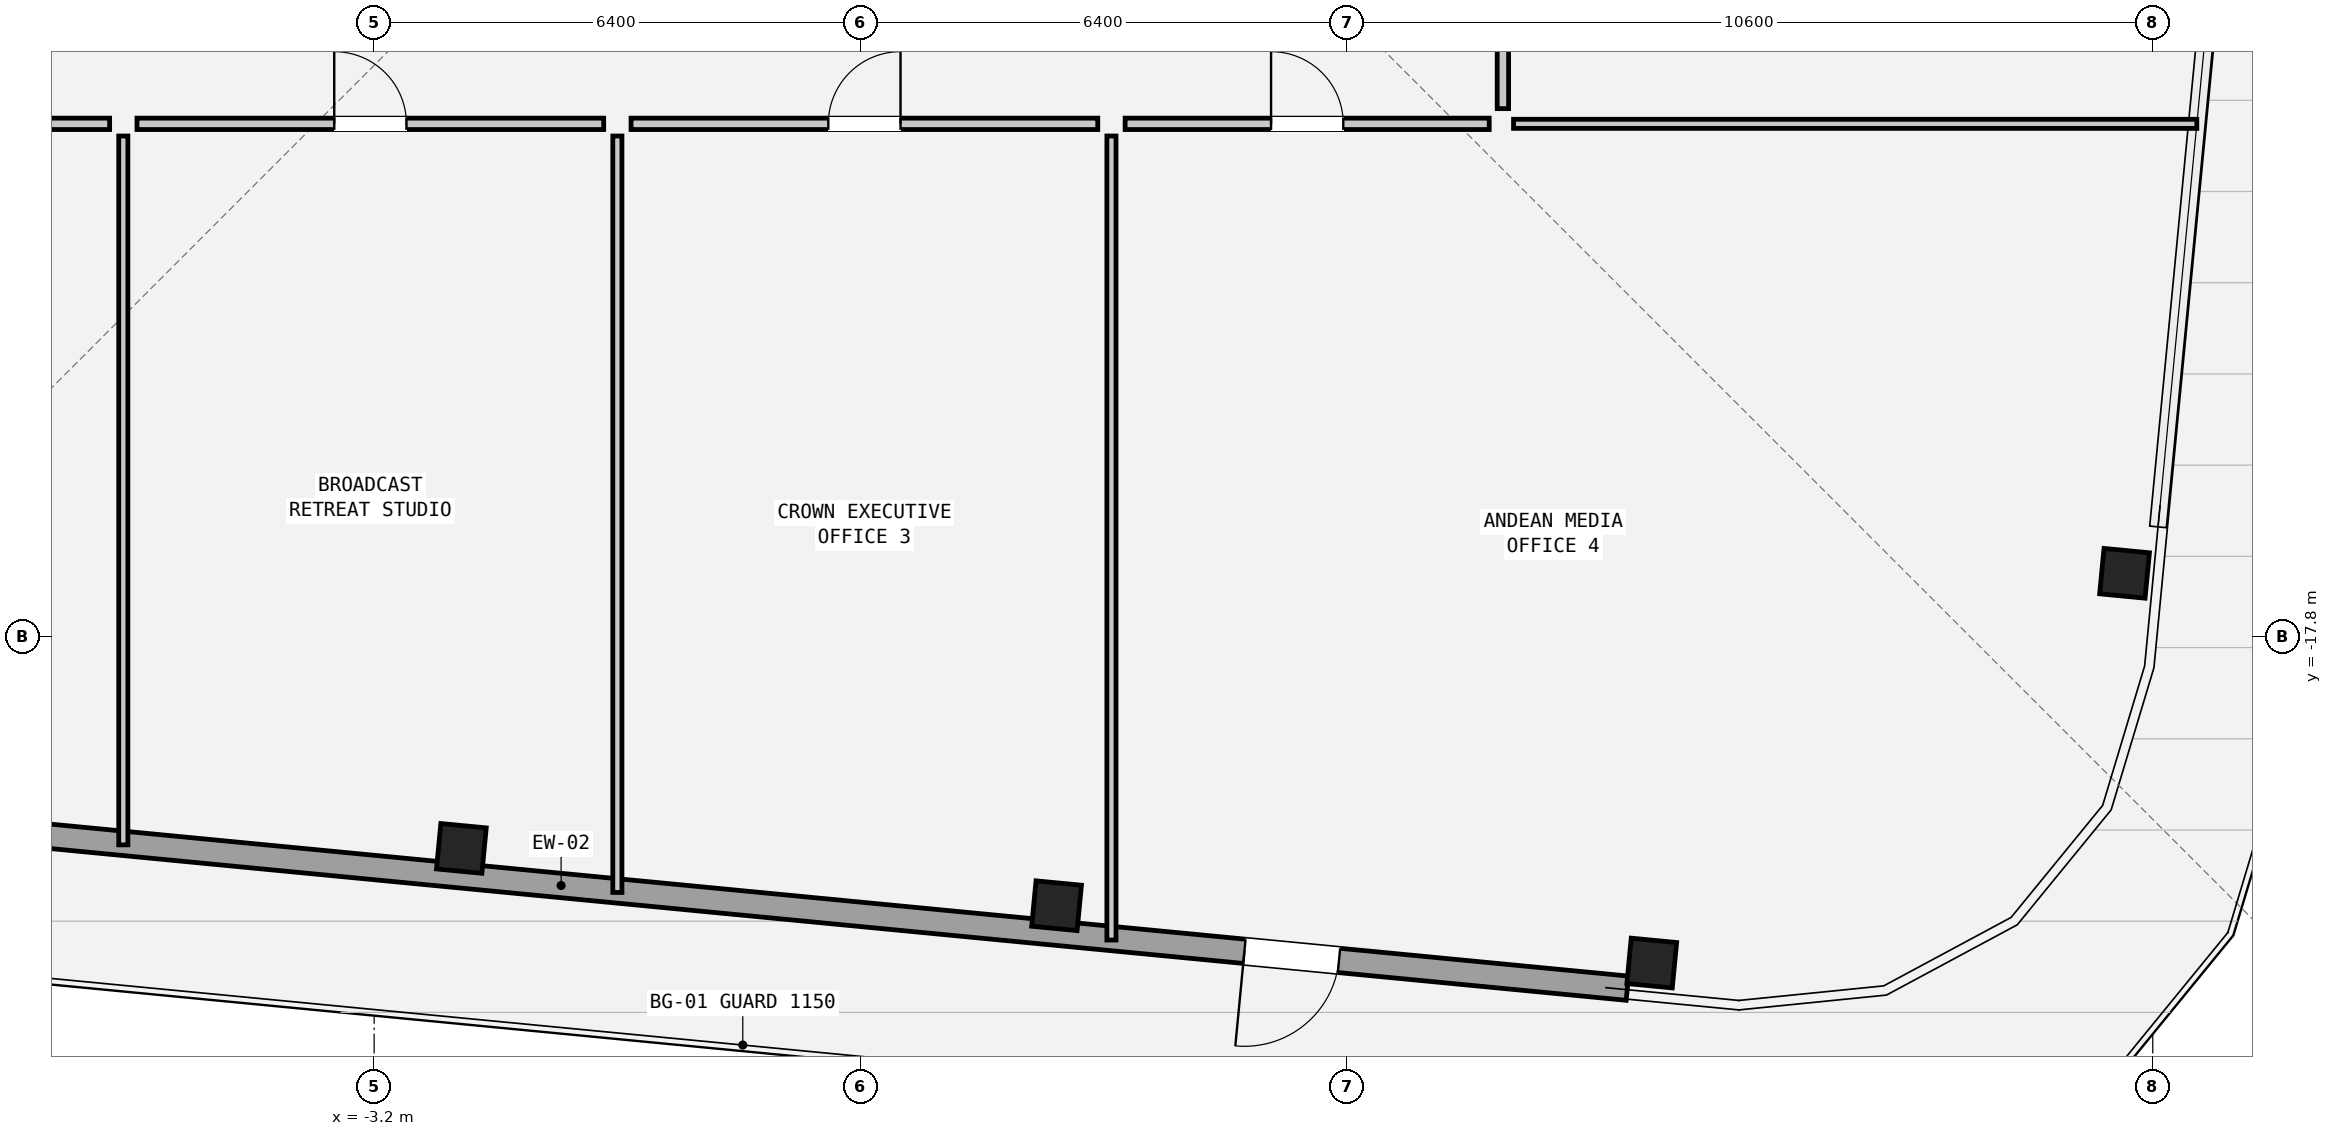
"""IFC4 building model, lengths in metres.
Left out: names, types, materials, properties, quantities, classifications, styles, units other than length and angle.
Written with IfcOpenShell. Run it as: python <this file> out.ifc"""

import sys

from ifc_helpers import new_model, si_unit, direction, frame, frame_2d, origin, origin_2d, place, context, subcontext, project, spatial, rectangle, hollow_rectangle, extrude, element, fill, save


model = new_model("IFC4")
c1 = context("Model", 3, precision=1e-05, world=origin(), true_north=direction((0.0, 1.0)))
c2 = subcontext(c1, "Body", "Model", "MODEL_VIEW")
j1 = project(units=[si_unit("LENGTHUNIT", "METRE"), si_unit("PLANEANGLEUNIT", "RADIAN")], contexts=[c1])
p1 = place(None, origin())
s1 = spatial("IfcSite", under=j1, at=p1, CompositionType="ELEMENT")
p2 = place(p1, origin())
s2 = spatial("IfcBuilding", under=s1, at=p2, CompositionType="ELEMENT")
p3 = place(p2, frame((0.0, 0.0, 273.35)))
s3 = spatial("IfcBuildingStorey", under=s2, at=p3, CompositionType="ELEMENT", Elevation=273.35)
for number, where, z_axis, x_axis in (
    (1, (-2.052, -20.583, 0.0), (0.0, 0.0, 1.0), (0.995, -0.096, 0.0)),
    (2, (5.778, -21.336, 0.0), (0.0, 0.0, 1.0), (0.995, -0.096, 0.0)),
    (3, (13.608, -22.09, 0.0), (0.0, 0.0, 1.0), (0.995, -0.096, 0.0)),
    (4, (19.829, -16.963, 0.0), (0.0, 0.0, 1.0), (0.096, 0.995, 0.0)),
):
    element("IfcColumn", number, at=place(p3, frame(where, z_axis=z_axis, x_axis=x_axis)), inside=s3, PredefinedType="COLUMN", context=c2, shape_type="SweptSolid", body=[
        extrude(hollow_rectangle(XDim=0.6, YDim=0.6, WallThickness=0.04, at=origin_2d()), origin(), (0.0, 0.0, 1.0), 3.6),
    ])
p4 = place(p3, frame((13.287, -22.421, 0.0), z_axis=(0.0, 0.0, 1.0), x_axis=(-0.995396042099, 0.095847375411, 0.0)))
e5 = element("IfcWall", 5, at=p4, inside=s3, PredefinedType="SOLIDWALL", context=c2, shape_type="SweptSolid", body=[
    extrude(rectangle(XDim=23.024, YDim=0.32, at=frame_2d((11.512, 0.0))), origin(), (0.0, 0.0, 1.0), 2.984),
])
p5 = place(p4, frame((3.811, 0.0, 0.0)))
e6 = element("IfcOpeningElement", 6, at=p5, cuts=e5, PredefinedType="OPENING", context=c2, shape_type="SweptSolid", body=[
    extrude(rectangle(XDim=1.25, YDim=2.02, at=frame_2d((0.625, 1.01))), frame((0.0, 0.172, 0.0), z_axis=(0.0, -1.0, 0.0), x_axis=(1.0, 0.0, 0.0)), (0.0, 0.0, 1.0), 0.344),
])
p6 = place(p3, frame((11.79, -11.05, 0.0), z_axis=(0.0, 0.0, 1.0), x_axis=(1.0, 0.0, 0.0)))
e7 = element("IfcWall", 7, at=p6, inside=s3, PredefinedType="PARTITIONING", context=c2, shape_type="SweptSolid", body=[
    extrude(rectangle(XDim=8.99, YDim=0.12, at=frame_2d((4.495, 0.0))), origin(), (0.0, 0.0, 1.0), 3.41),
])
p7 = place(p3, frame((-6.5, -20.536, 0.0), z_axis=(0.0, 0.0, 1.0), x_axis=(0.0, 1.0, 0.0)))
e8 = element("IfcWall", 8, at=p7, inside=s3, PredefinedType="PARTITIONING", context=c2, shape_type="SweptSolid", body=[
    extrude(rectangle(XDim=9.326, YDim=0.12, at=frame_2d((4.663, 0.0))), origin(), (0.0, 0.0, 1.0), 2.931),
])
p8 = place(p3, frame((0.0, -21.162, 0.0), z_axis=(0.0, 0.0, 1.0), x_axis=(0.0, 1.0, 0.0)))
e9 = element("IfcWall", 9, at=p8, inside=s3, PredefinedType="PARTITIONING", context=c2, shape_type="SweptSolid", body=[
    extrude(rectangle(XDim=9.952, YDim=0.12, at=frame_2d((4.976, 0.0))), origin(), (0.0, 0.0, 1.0), 2.931),
])
p9 = place(p3, frame((6.5, -21.788, 0.0), z_axis=(0.0, 0.0, 1.0), x_axis=(0.0, 1.0, 0.0)))
e10 = element("IfcWall", 10, at=p9, inside=s3, PredefinedType="PARTITIONING", context=c2, shape_type="SweptSolid", body=[
    extrude(rectangle(XDim=10.578, YDim=0.12, at=frame_2d((5.289, 0.0))), origin(), (0.0, 0.0, 1.0), 2.931),
])
p10 = place(p3, frame((-11.12, -11.05, 0.0), z_axis=(0.0, 0.0, 1.0), x_axis=(1.0, 0.0, 0.0)))
e11 = element("IfcWall", 11, at=p10, inside=s3, PredefinedType="PARTITIONING", context=c2, shape_type="SweptSolid", body=[
    extrude(rectangle(XDim=4.44, YDim=0.15, at=frame_2d((2.22, 0.0))), origin(), (0.0, 0.0, 1.0), 3.41),
])
p11 = place(p10, frame((1.745, 0.0, 0.0)))
e12 = element("IfcOpeningElement", 12, at=p11, cuts=e11, PredefinedType="OPENING", context=c2, shape_type="SweptSolid", body=[
    extrude(rectangle(XDim=0.95, YDim=2.1, at=frame_2d((0.475, 1.05))), frame((0.0, 0.087, 0.0), z_axis=(0.0, -1.0, 0.0), x_axis=(1.0, 0.0, 0.0)), (0.0, 0.0, 1.0), 0.174),
])
p12 = place(p3, frame((-6.32, -11.05, 0.0), z_axis=(0.0, 0.0, 1.0), x_axis=(1.0, 0.0, 0.0)))
e13 = element("IfcWall", 13, at=p12, inside=s3, PredefinedType="PARTITIONING", context=c2, shape_type="SweptSolid", body=[
    extrude(rectangle(XDim=6.14, YDim=0.15, at=frame_2d((3.07, 0.0))), origin(), (0.0, 0.0, 1.0), 3.41),
])
p13 = place(p12, frame((2.595, 0.0, 0.0)))
e14 = element("IfcOpeningElement", 14, at=p13, cuts=e13, PredefinedType="OPENING", context=c2, shape_type="SweptSolid", body=[
    extrude(rectangle(XDim=0.95, YDim=2.1, at=frame_2d((0.475, 1.05))), frame((0.0, 0.087, 0.0), z_axis=(0.0, -1.0, 0.0), x_axis=(1.0, 0.0, 0.0)), (0.0, 0.0, 1.0), 0.174),
])
p14 = place(p3, frame((0.18, -11.05, 0.0), z_axis=(0.0, 0.0, 1.0), x_axis=(1.0, 0.0, 0.0)))
e15 = element("IfcWall", 15, at=p14, inside=s3, PredefinedType="PARTITIONING", context=c2, shape_type="SweptSolid", body=[
    extrude(rectangle(XDim=6.14, YDim=0.15, at=frame_2d((3.07, 0.0))), origin(), (0.0, 0.0, 1.0), 3.41),
])
p15 = place(p14, frame((2.595, 0.0, 0.0)))
e16 = element("IfcOpeningElement", 16, at=p15, cuts=e15, PredefinedType="OPENING", context=c2, shape_type="SweptSolid", body=[
    extrude(rectangle(XDim=0.95, YDim=2.1, at=frame_2d((0.475, 1.05))), frame((0.0, 0.087, 0.0), z_axis=(0.0, -1.0, 0.0), x_axis=(1.0, 0.0, 0.0)), (0.0, 0.0, 1.0), 0.174),
])
p16 = place(p3, frame((6.68, -11.05, 0.0), z_axis=(0.0, 0.0, 1.0), x_axis=(1.0, 0.0, 0.0)))
e17 = element("IfcWall", 17, at=p16, inside=s3, PredefinedType="PARTITIONING", context=c2, shape_type="SweptSolid", body=[
    extrude(rectangle(XDim=4.79, YDim=0.15, at=frame_2d((2.395, 0.0))), origin(), (0.0, 0.0, 1.0), 3.41),
])
p17 = place(p16, frame((1.92, 0.0, 0.0)))
e18 = element("IfcOpeningElement", 18, at=p17, cuts=e17, PredefinedType="OPENING", context=c2, shape_type="SweptSolid", body=[
    extrude(rectangle(XDim=0.95, YDim=2.1, at=frame_2d((0.475, 1.05))), frame((0.0, 0.087, 0.0), z_axis=(0.0, -1.0, 0.0), x_axis=(1.0, 0.0, 0.0)), (0.0, 0.0, 1.0), 0.174),
])
p18 = place(p3, frame((11.65, -10.85, 0.0), z_axis=(0.0, 0.0, 1.0), x_axis=(0.0, 1.0, 0.0)))
e19 = element("IfcWall", 19, at=p18, inside=s3, PredefinedType="PARTITIONING", context=c2, shape_type="SweptSolid", body=[
    extrude(rectangle(XDim=8.29, YDim=0.15, at=frame_2d((4.145, 0.0))), origin(), (0.0, 0.0, 1.0), 3.41),
])
p19 = place(p18, frame((3.67, 0.0, 0.0)))
e20 = element("IfcOpeningElement", 20, at=p19, cuts=e19, PredefinedType="OPENING", context=c2, shape_type="SweptSolid", body=[
    extrude(rectangle(XDim=0.95, YDim=2.1, at=frame_2d((0.475, 1.05))), frame((0.0, 0.087, 0.0), z_axis=(0.0, -1.0, 0.0), x_axis=(1.0, 0.0, 0.0)), (0.0, 0.0, 1.0), 0.174),
])
p20 = place(p5, origin())
e21 = element("IfcDoor", 21, at=p20, inside=s3, OperationType="SINGLE_SWING_RIGHT", PredefinedType="DOOR", context=c2, shape_type="SweptSolid", body=[
    extrude(rectangle(XDim=1.25, YDim=2.02, at=frame_2d((0.625, 1.01))), frame((0.0, 0.025, 0.0), z_axis=(0.0, -1.0, 0.0), x_axis=(1.0, 0.0, 0.0)), (0.0, 0.0, 1.0), 0.05),
])
fill(e6, e21)
p21 = place(p13, origin())
e22 = element("IfcDoor", 22, at=p21, inside=s3, OperationType="SINGLE_SWING_LEFT", PredefinedType="DOOR", context=c2, shape_type="SweptSolid", body=[
    extrude(rectangle(XDim=0.95, YDim=2.1, at=frame_2d((0.475, 1.05))), frame((0.0, 0.025, 0.0), z_axis=(0.0, -1.0, 0.0), x_axis=(1.0, 0.0, 0.0)), (0.0, 0.0, 1.0), 0.05),
])
fill(e14, e22)
p22 = place(p15, origin())
e23 = element("IfcDoor", 23, at=p22, inside=s3, OperationType="SINGLE_SWING_RIGHT", PredefinedType="DOOR", context=c2, shape_type="SweptSolid", body=[
    extrude(rectangle(XDim=0.95, YDim=2.1, at=frame_2d((0.475, 1.05))), frame((0.0, 0.025, 0.0), z_axis=(0.0, -1.0, 0.0), x_axis=(1.0, 0.0, 0.0)), (0.0, 0.0, 1.0), 0.05),
])
fill(e16, e23)
p23 = place(p17, origin())
e24 = element("IfcDoor", 24, at=p23, inside=s3, OperationType="SINGLE_SWING_LEFT", PredefinedType="DOOR", context=c2, shape_type="SweptSolid", body=[
    extrude(rectangle(XDim=0.95, YDim=2.1, at=frame_2d((0.475, 1.05))), frame((0.0, 0.025, 0.0), z_axis=(0.0, -1.0, 0.0), x_axis=(1.0, 0.0, 0.0)), (0.0, 0.0, 1.0), 0.05),
])
fill(e18, e24)
save(model, sys.argv[1])
